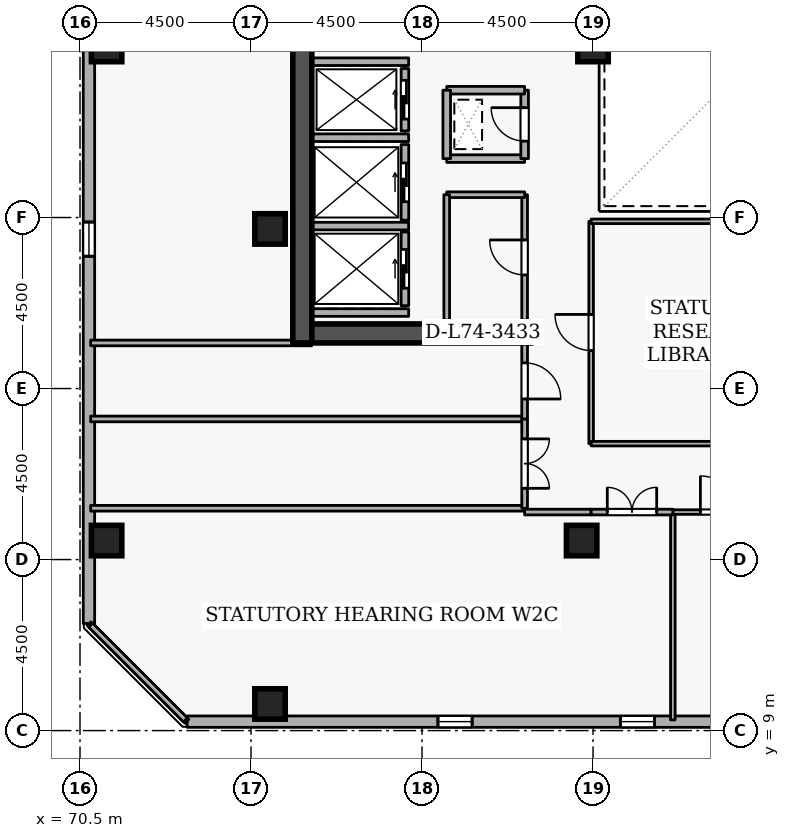
"""IFC4 building model, lengths in metres.
Left out: names, types, materials, properties, quantities, classifications, styles, units other than length and angle.
Written with IfcOpenShell. Run it as: python <this file> out.ifc"""

import sys

from ifc_helpers import new_model, si_unit, direction, frame, frame_2d, origin, origin_2d, place, context, subcontext, project, spatial, rectangle, extrude, element, fill, save


model = new_model("IFC4")
c1 = context("Model", 3, precision=1e-05, world=origin(), true_north=direction((0.0, 1.0)))
c2 = subcontext(c1, "Body", "Model", "MODEL_VIEW")
j1 = project(units=[si_unit("LENGTHUNIT", "METRE"), si_unit("PLANEANGLEUNIT", "RADIAN")], contexts=[c1])
p1 = place(None, origin())
s1 = spatial("IfcSite", under=j1, at=p1, CompositionType="ELEMENT")
p2 = place(p1, origin())
s2 = spatial("IfcBuilding", under=s1, at=p2, CompositionType="ELEMENT")
p3 = place(p2, frame((0.0, 0.0, 276.3)))
s3 = spatial("IfcBuildingStorey", under=s2, at=p3, CompositionType="ELEMENT", Elevation=276.3)
p4 = place(p3, frame((76.35, 19.2, 0.0), z_axis=(0.0, 0.0, 1.0), x_axis=(0.0, 1.0, 0.0)))
e1 = element("IfcWall", 1, at=p4, inside=s3, PredefinedType="SHEAR", context=c2, shape_type="SweptSolid", body=[
    extrude(rectangle(XDim=15.6, YDim=0.5, at=frame_2d((7.8, 0.0))), origin(), (0.0, 0.0, 1.0), 3.6),
])
p5 = place(p3, frame((76.6, 19.45, 0.0), z_axis=(0.0, 0.0, 1.0), x_axis=(1.0, 0.0, 0.0)))
e2 = element("IfcWall", 2, at=p5, inside=s3, PredefinedType="SHEAR", context=c2, shape_type="SweptSolid", body=[
    extrude(rectangle(XDim=5.8, YDim=0.5, at=frame_2d((2.9, 0.0))), origin(), (0.0, 0.0, 1.0), 3.6),
])
for number, where, z_axis, x_axis in (
    (3, (71.2, 14.0, 0.0), (0.0, 0.0, 1.0), (1.0, 0.0, 0.0)),
    (4, (71.2, 27.0, 0.0), (0.0, 0.0, 1.0), (1.0, 0.0, 0.0)),
    (5, (75.5, 9.7, 0.0), (0.0, 0.0, 1.0), (1.0, 0.0, 0.0)),
    (6, (83.7, 14.0, 0.0), (0.0, 0.0, 1.0), (1.0, 0.0, 0.0)),
    (7, (75.5, 22.2, 0.0), (0.0, 0.0, 1.0), (1.0, 0.0, 0.0)),
    (8, (84.0, 27.0, 0.0), (0.0, 0.0, 1.0), (1.0, 0.0, 0.0)),
):
    element("IfcColumn", number, at=place(p3, frame(where, z_axis=z_axis, x_axis=x_axis)), inside=s3, PredefinedType="COLUMN", context=c2, shape_type="SweptSolid", body=[
        extrude(rectangle(XDim=0.8, YDim=0.8, at=origin_2d()), origin(), (0.0, 0.0, 1.0), 3.6),
    ])
p6 = place(p3, frame((73.319, 9.235, 0.0), z_axis=(0.0, 0.0, 1.0), x_axis=(1.0, 0.0, 0.0)))
e9 = element("IfcWall", 9, at=p6, inside=s3, PredefinedType="STANDARD", context=c2, shape_type="SweptSolid", body=[
    extrude(rectangle(XDim=36.363, YDim=0.3, at=frame_2d((18.181, 0.0))), origin(), (0.0, 0.0, 1.0), 2.66),
])
p7 = place(p6, frame((6.6, 0.0, 0.72)))
e10 = element("IfcOpeningElement", 10, at=p7, cuts=e9, PredefinedType="OPENING", context=c2, shape_type="SweptSolid", body=[
    extrude(rectangle(XDim=0.9, YDim=1.75, at=frame_2d((0.45, 0.875))), frame((0.0, 0.16, 0.0), z_axis=(0.0, -1.0, 0.0), x_axis=(1.0, 0.0, 0.0)), (0.0, 0.0, 1.0), 0.32),
])
p8 = place(p6, frame((11.4, 0.0, 0.72)))
e11 = element("IfcOpeningElement", 11, at=p8, cuts=e9, PredefinedType="OPENING", context=c2, shape_type="SweptSolid", body=[
    extrude(rectangle(XDim=0.9, YDim=1.75, at=frame_2d((0.45, 0.875))), frame((0.0, 0.16, 0.0), z_axis=(0.0, -1.0, 0.0), x_axis=(1.0, 0.0, 0.0)), (0.0, 0.0, 1.0), 0.32),
])
p9 = place(p6, frame((21.0, 0.0, 0.72)))
e12 = element("IfcOpeningElement", 12, at=p9, cuts=e9, PredefinedType="OPENING", context=c2, shape_type="SweptSolid", body=[
    extrude(rectangle(XDim=0.9, YDim=1.75, at=frame_2d((0.45, 0.875))), frame((0.0, 0.16, 0.0), z_axis=(0.0, -1.0, 0.0), x_axis=(1.0, 0.0, 0.0)), (0.0, 0.0, 1.0), 0.32),
])
p10 = place(p6, frame((25.8, 0.0, 0.72)))
e13 = element("IfcOpeningElement", 13, at=p10, cuts=e9, PredefinedType="OPENING", context=c2, shape_type="SweptSolid", body=[
    extrude(rectangle(XDim=0.9, YDim=1.75, at=frame_2d((0.45, 0.875))), frame((0.0, 0.16, 0.0), z_axis=(0.0, -1.0, 0.0), x_axis=(1.0, 0.0, 0.0)), (0.0, 0.0, 1.0), 0.32),
])
p11 = place(p6, frame((30.6, 0.0, 0.72)))
e14 = element("IfcOpeningElement", 14, at=p11, cuts=e9, PredefinedType="OPENING", context=c2, shape_type="SweptSolid", body=[
    extrude(rectangle(XDim=0.9, YDim=1.75, at=frame_2d((0.45, 0.875))), frame((0.0, 0.16, 0.0), z_axis=(0.0, -1.0, 0.0), x_axis=(1.0, 0.0, 0.0)), (0.0, 0.0, 1.0), 0.32),
])
p12 = place(p3, frame((70.735, 48.181, 0.0), z_axis=(0.0, 0.0, 1.0), x_axis=(0.0, -1.0, 0.0)))
e15 = element("IfcWall", 15, at=p12, inside=s3, PredefinedType="STANDARD", context=c2, shape_type="SweptSolid", body=[
    extrude(rectangle(XDim=36.363, YDim=0.3, at=frame_2d((18.181, 0.0))), origin(), (0.0, 0.0, 1.0), 2.66),
])
p13 = place(p12, frame((1.8, 0.0, 0.72)))
e16 = element("IfcOpeningElement", 16, at=p13, cuts=e15, PredefinedType="OPENING", context=c2, shape_type="SweptSolid", body=[
    extrude(rectangle(XDim=0.9, YDim=1.75, at=frame_2d((0.45, 0.875))), frame((0.0, 0.16, 0.0), z_axis=(0.0, -1.0, 0.0), x_axis=(1.0, 0.0, 0.0)), (0.0, 0.0, 1.0), 0.32),
])
p14 = place(p12, frame((11.4, 0.0, 0.72)))
e17 = element("IfcOpeningElement", 17, at=p14, cuts=e15, PredefinedType="OPENING", context=c2, shape_type="SweptSolid", body=[
    extrude(rectangle(XDim=0.9, YDim=1.75, at=frame_2d((0.45, 0.875))), frame((0.0, 0.16, 0.0), z_axis=(0.0, -1.0, 0.0), x_axis=(1.0, 0.0, 0.0)), (0.0, 0.0, 1.0), 0.32),
])
p15 = place(p12, frame((16.2, 0.0, 0.72)))
e18 = element("IfcOpeningElement", 18, at=p15, cuts=e15, PredefinedType="OPENING", context=c2, shape_type="SweptSolid", body=[
    extrude(rectangle(XDim=0.9, YDim=1.75, at=frame_2d((0.45, 0.875))), frame((0.0, 0.16, 0.0), z_axis=(0.0, -1.0, 0.0), x_axis=(1.0, 0.0, 0.0)), (0.0, 0.0, 1.0), 0.32),
])
p16 = place(p12, frame((25.8, 0.0, 0.72)))
e19 = element("IfcOpeningElement", 19, at=p16, cuts=e15, PredefinedType="OPENING", context=c2, shape_type="SweptSolid", body=[
    extrude(rectangle(XDim=0.9, YDim=1.75, at=frame_2d((0.45, 0.875))), frame((0.0, 0.16, 0.0), z_axis=(0.0, -1.0, 0.0), x_axis=(1.0, 0.0, 0.0)), (0.0, 0.0, 1.0), 0.32),
])
p17 = place(p3, frame((79.05, 24.78, 0.0), z_axis=(0.0, 0.0, 1.0), x_axis=(0.0, 1.0, 0.0)))
e20 = element("IfcWall", 20, at=p17, inside=s3, PredefinedType="STANDARD", context=c2, shape_type="SweptSolid", body=[
    extrude(rectangle(XDim=1.64, YDim=0.2, at=frame_2d((0.82, 0.0))), origin(), (0.0, 0.0, 1.0), 3.26),
])
p18 = place(p17, frame((0.31, 0.0, 0.0)))
e21 = element("IfcOpeningElement", 21, at=p18, cuts=e20, PredefinedType="OPENING", context=c2, shape_type="SweptSolid", body=[
    extrude(rectangle(XDim=1.02, YDim=2.06, at=frame_2d((0.51, 1.03))), frame((0.0, 0.11, 0.0), z_axis=(0.0, -1.0, 0.0), x_axis=(1.0, 0.0, 0.0)), (0.0, 0.0, 1.0), 0.22),
])
p19 = place(p3, frame((79.05, 22.43, 0.0), z_axis=(0.0, 0.0, 1.0), x_axis=(0.0, 1.0, 0.0)))
e22 = element("IfcWall", 22, at=p19, inside=s3, PredefinedType="STANDARD", context=c2, shape_type="SweptSolid", body=[
    extrude(rectangle(XDim=1.99, YDim=0.2, at=frame_2d((0.995, 0.0))), origin(), (0.0, 0.0, 1.0), 3.26),
])
p20 = place(p19, frame((0.485, 0.0, 0.0)))
e23 = element("IfcOpeningElement", 23, at=p20, cuts=e22, PredefinedType="OPENING", context=c2, shape_type="SweptSolid", body=[
    extrude(rectangle(XDim=1.02, YDim=2.06, at=frame_2d((0.51, 1.03))), frame((0.0, 0.11, 0.0), z_axis=(0.0, -1.0, 0.0), x_axis=(1.0, 0.0, 0.0)), (0.0, 0.0, 1.0), 0.22),
])
p21 = place(p3, frame((79.05, 20.18, 0.0), z_axis=(0.0, 0.0, 1.0), x_axis=(0.0, 1.0, 0.0)))
e24 = element("IfcWall", 24, at=p21, inside=s3, PredefinedType="STANDARD", context=c2, shape_type="SweptSolid", body=[
    extrude(rectangle(XDim=1.94, YDim=0.2, at=frame_2d((0.97, 0.0))), origin(), (0.0, 0.0, 1.0), 3.26),
])
p22 = place(p21, frame((0.46, 0.0, 0.0)))
e25 = element("IfcOpeningElement", 25, at=p22, cuts=e24, PredefinedType="OPENING", context=c2, shape_type="SweptSolid", body=[
    extrude(rectangle(XDim=1.02, YDim=2.06, at=frame_2d((0.51, 1.03))), frame((0.0, 0.11, 0.0), z_axis=(0.0, -1.0, 0.0), x_axis=(1.0, 0.0, 0.0)), (0.0, 0.0, 1.0), 0.22),
])
for number, where, z_axis, x_axis in (
    (26, (76.612, 26.6, 0.0), (0.0, 0.0, 1.0), (1.0, 0.0, 0.0)),
    (27, (76.612, 24.6, 0.0), (0.0, 0.0, 1.0), (1.0, 0.0, 0.0)),
    (28, (76.612, 22.275, 0.0), (0.0, 0.0, 1.0), (1.0, 0.0, 0.0)),
    (29, (76.612, 20.0, 0.0), (0.0, 0.0, 1.0), (1.0, 0.0, 0.0)),
):
    element("IfcWall", number, at=place(p3, frame(where, z_axis=z_axis, x_axis=x_axis)), inside=s3, PredefinedType="STANDARD", context=c2, shape_type="SweptSolid", body=[
        extrude(rectangle(XDim=2.536, YDim=0.2, at=frame_2d((1.268, 0.0))), origin(), (0.0, 0.0, 1.0), 3.26),
    ])
p23 = place(p3, frame((80.15, 24.05, 0.0), z_axis=(0.0, 0.0, 1.0), x_axis=(1.0, 0.0, 0.0)))
e30 = element("IfcWall", 30, at=p23, inside=s3, PredefinedType="STANDARD", context=c2, shape_type="SweptSolid", body=[
    extrude(rectangle(XDim=2.05, YDim=0.2, at=frame_2d((1.025, 0.0))), origin(), (0.0, 0.0, 1.0), 3.26),
])
p24 = place(p3, frame((82.2, 24.05, 0.0), z_axis=(0.0, 0.0, 1.0), x_axis=(0.0, 1.0, 0.0)))
e31 = element("IfcWall", 31, at=p24, inside=s3, PredefinedType="STANDARD", context=c2, shape_type="SweptSolid", body=[
    extrude(rectangle(XDim=1.8, YDim=0.2, at=frame_2d((0.9, 0.0))), origin(), (0.0, 0.0, 1.0), 3.26),
])
p25 = place(p24, frame((0.46, 0.0, 0.0)))
e32 = element("IfcOpeningElement", 32, at=p25, cuts=e31, PredefinedType="OPENING", context=c2, shape_type="SweptSolid", body=[
    extrude(rectangle(XDim=0.88, YDim=2.04, at=frame_2d((0.44, 1.02))), frame((0.0, 0.11, 0.0), z_axis=(0.0, -1.0, 0.0), x_axis=(1.0, 0.0, 0.0)), (0.0, 0.0, 1.0), 0.22),
])
p26 = place(p3, frame((82.2, 25.85, 0.0), z_axis=(0.0, 0.0, 1.0), x_axis=(-1.0, 0.0, 0.0)))
e33 = element("IfcWall", 33, at=p26, inside=s3, PredefinedType="STANDARD", context=c2, shape_type="SweptSolid", body=[
    extrude(rectangle(XDim=2.05, YDim=0.2, at=frame_2d((1.025, 0.0))), origin(), (0.0, 0.0, 1.0), 3.26),
])
p27 = place(p3, frame((80.15, 25.85, 0.0), z_axis=(0.0, 0.0, 1.0), x_axis=(0.0, -1.0, 0.0)))
e34 = element("IfcWall", 34, at=p27, inside=s3, PredefinedType="STANDARD", context=c2, shape_type="SweptSolid", body=[
    extrude(rectangle(XDim=1.8, YDim=0.2, at=frame_2d((0.9, 0.0))), origin(), (0.0, 0.0, 1.0), 3.26),
])
p28 = place(p3, frame((82.2, 19.8, 0.0), z_axis=(0.0, 0.0, 1.0), x_axis=(0.0, 1.0, 0.0)))
e35 = element("IfcWall", 35, at=p28, inside=s3, PredefinedType="PARTITIONING", context=c2, shape_type="SweptSolid", body=[
    extrude(rectangle(XDim=3.3, YDim=0.15, at=frame_2d((1.65, 0.0))), origin(), (0.0, 0.0, 1.0), 3.26),
])
p29 = place(p28, frame((1.19, 0.0, 0.0)))
e36 = element("IfcOpeningElement", 36, at=p29, cuts=e35, PredefinedType="OPENING", context=c2, shape_type="SweptSolid", body=[
    extrude(rectangle(XDim=0.92, YDim=2.08, at=frame_2d((0.46, 1.04))), frame((0.0, 0.085, 0.0), z_axis=(0.0, -1.0, 0.0), x_axis=(1.0, 0.0, 0.0)), (0.0, 0.0, 1.0), 0.17),
])
p30 = place(p3, frame((82.2, 23.1, 0.0), z_axis=(0.0, 0.0, 1.0), x_axis=(-1.0, 0.0, 0.0)))
e37 = element("IfcWall", 37, at=p30, inside=s3, PredefinedType="PARTITIONING", context=c2, shape_type="SweptSolid", body=[
    extrude(rectangle(XDim=2.05, YDim=0.15, at=frame_2d((1.025, 0.0))), origin(), (0.0, 0.0, 1.0), 3.26),
])
p31 = place(p3, frame((80.15, 23.1, 0.0), z_axis=(0.0, 0.0, 1.0), x_axis=(0.0, -1.0, 0.0)))
e38 = element("IfcWall", 38, at=p31, inside=s3, PredefinedType="PARTITIONING", context=c2, shape_type="SweptSolid", body=[
    extrude(rectangle(XDim=3.3, YDim=0.15, at=frame_2d((1.65, 0.0))), origin(), (0.0, 0.0, 1.0), 3.26),
])
for number, where, z_axis, x_axis in (
    (39, (82.2, 14.85, 0.0), (0.0, 0.0, 1.0), (-1.0, 0.0, 0.0)),
    (40, (70.78, 17.2, 0.0), (0.0, 0.0, 1.0), (1.0, 0.0, 0.0)),
):
    element("IfcWall", number, at=place(p3, frame(where, z_axis=z_axis, x_axis=x_axis)), inside=s3, PredefinedType="PARTITIONING", context=c2, shape_type="SweptSolid", body=[
        extrude(rectangle(XDim=11.42, YDim=0.15, at=frame_2d((5.71, 0.0))), origin(), (0.0, 0.0, 1.0), 3.26),
    ])
p32 = place(p3, frame((82.2, 17.2, 0.0), z_axis=(0.0, 0.0, 1.0), x_axis=(0.0, -1.0, 0.0)))
e41 = element("IfcWall", 41, at=p32, inside=s3, PredefinedType="PARTITIONING", context=c2, shape_type="SweptSolid", body=[
    extrude(rectangle(XDim=2.35, YDim=0.15, at=frame_2d((1.175, 0.0))), origin(), (0.0, 0.0, 1.0), 3.26),
])
p33 = place(p32, frame((0.525, 0.0, 0.0)))
e42 = element("IfcOpeningElement", 42, at=p33, cuts=e41, PredefinedType="OPENING", context=c2, shape_type="SweptSolid", body=[
    extrude(rectangle(XDim=1.3, YDim=2.12, at=frame_2d((0.65, 1.06))), frame((0.0, 0.085, 0.0), z_axis=(0.0, -1.0, 0.0), x_axis=(1.0, 0.0, 0.0)), (0.0, 0.0, 1.0), 0.17),
])
p34 = place(p3, frame((70.78, 19.2, 0.0), z_axis=(0.0, 0.0, 1.0), x_axis=(1.0, 0.0, 0.0)))
e43 = element("IfcWall", 43, at=p34, inside=s3, PredefinedType="PARTITIONING", context=c2, shape_type="SweptSolid", body=[
    extrude(rectangle(XDim=5.82, YDim=0.15, at=frame_2d((2.91, 0.0))), origin(), (0.0, 0.0, 1.0), 2.465),
])
p35 = place(p3, frame((82.2, 19.2, 0.0), z_axis=(0.0, 0.0, 1.0), x_axis=(0.0, -1.0, 0.0)))
e44 = element("IfcWall", 44, at=p35, inside=s3, PredefinedType="PARTITIONING", context=c2, shape_type="SweptSolid", body=[
    extrude(rectangle(XDim=2.0, YDim=0.15, at=frame_2d((1.0, 0.0))), origin(), (0.0, 0.0, 1.0), 3.26),
])
p36 = place(p35, frame((0.525, 0.0, 0.0)))
e45 = element("IfcOpeningElement", 45, at=p36, cuts=e44, PredefinedType="OPENING", context=c2, shape_type="SweptSolid", body=[
    extrude(rectangle(XDim=0.95, YDim=2.1, at=frame_2d((0.475, 1.05))), frame((0.0, 0.085, 0.0), z_axis=(0.0, -1.0, 0.0), x_axis=(1.0, 0.0, 0.0)), (0.0, 0.0, 1.0), 0.17),
])
p37 = place(p3, frame((86.1, 9.28, 0.0), z_axis=(0.0, 0.0, 1.0), x_axis=(0.0, 1.0, 0.0)))
e46 = element("IfcWall", 46, at=p37, inside=s3, PredefinedType="PARTITIONING", context=c2, shape_type="SweptSolid", body=[
    extrude(rectangle(XDim=5.47, YDim=0.12, at=frame_2d((2.735, 0.0))), origin(), (0.0, 0.0, 1.0), 3.26),
])
p38 = place(p3, frame((86.1, 14.75, 0.0), z_axis=(0.0, 0.0, 1.0), x_axis=(1.0, 0.0, 0.0)))
e47 = element("IfcWall", 47, at=p38, inside=s3, PredefinedType="PARTITIONING", context=c2, shape_type="SweptSolid", body=[
    extrude(rectangle(XDim=2.4, YDim=0.12, at=frame_2d((1.2, 0.0))), origin(), (0.0, 0.0, 1.0), 3.26),
])
p39 = place(p38, frame((0.725, 0.0, 0.0)))
e48 = element("IfcOpeningElement", 48, at=p39, cuts=e47, PredefinedType="OPENING", context=c2, shape_type="SweptSolid", body=[
    extrude(rectangle(XDim=0.95, YDim=2.1, at=frame_2d((0.475, 1.05))), frame((0.0, 0.07, 0.0), z_axis=(0.0, -1.0, 0.0), x_axis=(1.0, 0.0, 0.0)), (0.0, 0.0, 1.0), 0.14),
])
p40 = place(p3, frame((73.275, 9.28, 0.0), z_axis=(0.0, 0.0, 1.0), x_axis=(-0.707106781187, 0.707106781187, 0.0)))
e49 = element("IfcWall", 49, at=p40, inside=s3, PredefinedType="PARTITIONING", context=c2, shape_type="SweptSolid", body=[
    extrude(rectangle(XDim=3.528, YDim=0.15, at=frame_2d((1.764, 0.0))), origin(), (0.0, 0.0, 1.0), 3.26),
])
p41 = place(p3, frame((82.2, 14.75, 0.0), z_axis=(0.0, 0.0, 1.0), x_axis=(1.0, 0.0, 0.0)))
e50 = element("IfcWall", 50, at=p41, inside=s3, PredefinedType="PARTITIONING", context=c2, shape_type="SweptSolid", body=[
    extrude(rectangle(XDim=1.75, YDim=0.15, at=frame_2d((0.875, 0.0))), origin(), (0.0, 0.0, 1.0), 3.26),
])
p42 = place(p3, frame((83.95, 14.75, 0.0), z_axis=(0.0, 0.0, 1.0), x_axis=(1.0, 0.0, 0.0)))
e51 = element("IfcWall", 51, at=p42, inside=s3, PredefinedType="PARTITIONING", context=c2, shape_type="SweptSolid", body=[
    extrude(rectangle(XDim=2.15, YDim=0.15, at=frame_2d((1.075, 0.0))), origin(), (0.0, 0.0, 1.0), 3.26),
])
p43 = place(p42, frame((0.425, 0.0, 0.0)))
e52 = element("IfcOpeningElement", 52, at=p43, cuts=e51, PredefinedType="OPENING", context=c2, shape_type="SweptSolid", body=[
    extrude(rectangle(XDim=1.3, YDim=2.12, at=frame_2d((0.65, 1.06))), frame((0.0, 0.085, 0.0), z_axis=(0.0, -1.0, 0.0), x_axis=(1.0, 0.0, 0.0)), (0.0, 0.0, 1.0), 0.17),
])
p44 = place(p3, frame((83.95, 16.55, 0.0), z_axis=(0.0, 0.0, 1.0), x_axis=(0.0, 1.0, 0.0)))
e53 = element("IfcWall", 53, at=p44, inside=s3, PredefinedType="PARTITIONING", context=c2, shape_type="SweptSolid", body=[
    extrude(rectangle(XDim=5.85, YDim=0.12, at=frame_2d((2.925, 0.0))), origin(), (0.0, 0.0, 1.0), 3.26),
])
p45 = place(p44, frame((2.45, 0.0, 0.0)))
e54 = element("IfcOpeningElement", 54, at=p45, cuts=e53, PredefinedType="OPENING", context=c2, shape_type="SweptSolid", body=[
    extrude(rectangle(XDim=0.95, YDim=2.1, at=frame_2d((0.475, 1.05))), frame((0.0, 0.07, 0.0), z_axis=(0.0, -1.0, 0.0), x_axis=(1.0, 0.0, 0.0)), (0.0, 0.0, 1.0), 0.14),
])
for number, where, z_axis, x_axis in (
    (55, (83.95, 22.4, 0.0), (0.0, 0.0, 1.0), (1.0, 0.0, 0.0)),
    (56, (89.3, 16.55, 0.0), (0.0, 0.0, 1.0), (-1.0, 0.0, 0.0)),
):
    element("IfcWall", number, at=place(p3, frame(where, z_axis=z_axis, x_axis=x_axis)), inside=s3, PredefinedType="PARTITIONING", context=c2, shape_type="SweptSolid", body=[
        extrude(rectangle(XDim=5.35, YDim=0.12, at=frame_2d((2.675, 0.0))), origin(), (0.0, 0.0, 1.0), 3.26),
    ])
p46 = place(p7, origin())
e57 = element("IfcWindow", 57, at=p46, inside=s3, PartitioningType="SINGLE_PANEL", PredefinedType="WINDOW", context=c2, shape_type="SweptSolid", body=[
    extrude(rectangle(XDim=0.9, YDim=1.75, at=frame_2d((0.45, 0.875))), frame((0.0, 0.03, 0.0), z_axis=(0.0, -1.0, 0.0), x_axis=(1.0, 0.0, 0.0)), (0.0, 0.0, 1.0), 0.06),
])
fill(e10, e57)
p47 = place(p8, origin())
e58 = element("IfcWindow", 58, at=p47, inside=s3, PartitioningType="SINGLE_PANEL", PredefinedType="WINDOW", context=c2, shape_type="SweptSolid", body=[
    extrude(rectangle(XDim=0.9, YDim=1.75, at=frame_2d((0.45, 0.875))), frame((0.0, 0.03, 0.0), z_axis=(0.0, -1.0, 0.0), x_axis=(1.0, 0.0, 0.0)), (0.0, 0.0, 1.0), 0.06),
])
fill(e11, e58)
p48 = place(p16, origin())
e59 = element("IfcWindow", 59, at=p48, inside=s3, PartitioningType="SINGLE_PANEL", PredefinedType="WINDOW", context=c2, shape_type="SweptSolid", body=[
    extrude(rectangle(XDim=0.9, YDim=1.75, at=frame_2d((0.45, 0.875))), frame((0.0, 0.03, 0.0), z_axis=(0.0, -1.0, 0.0), x_axis=(1.0, 0.0, 0.0)), (0.0, 0.0, 1.0), 0.06),
])
fill(e19, e59)
p49 = place(p18, origin())
e60 = element("IfcDoor", 60, at=p49, inside=s3, OperationType="SLIDING_TO_LEFT", PredefinedType="DOOR", context=c2, shape_type="SweptSolid", body=[
    extrude(rectangle(XDim=1.02, YDim=2.06, at=frame_2d((0.51, 1.03))), frame((0.0, 0.025, 0.0), z_axis=(0.0, -1.0, 0.0), x_axis=(1.0, 0.0, 0.0)), (0.0, 0.0, 1.0), 0.05),
])
fill(e21, e60)
p50 = place(p20, origin())
e61 = element("IfcDoor", 61, at=p50, inside=s3, OperationType="SLIDING_TO_LEFT", PredefinedType="DOOR", context=c2, shape_type="SweptSolid", body=[
    extrude(rectangle(XDim=1.02, YDim=2.06, at=frame_2d((0.51, 1.03))), frame((0.0, 0.025, 0.0), z_axis=(0.0, -1.0, 0.0), x_axis=(1.0, 0.0, 0.0)), (0.0, 0.0, 1.0), 0.05),
])
fill(e23, e61)
p51 = place(p22, origin())
e62 = element("IfcDoor", 62, at=p51, inside=s3, OperationType="SLIDING_TO_LEFT", PredefinedType="DOOR", context=c2, shape_type="SweptSolid", body=[
    extrude(rectangle(XDim=1.02, YDim=2.06, at=frame_2d((0.51, 1.03))), frame((0.0, 0.025, 0.0), z_axis=(0.0, -1.0, 0.0), x_axis=(1.0, 0.0, 0.0)), (0.0, 0.0, 1.0), 0.05),
])
fill(e25, e62)
p52 = place(p25, origin())
e63 = element("IfcDoor", 63, at=p52, inside=s3, OperationType="SINGLE_SWING_RIGHT", PredefinedType="DOOR", context=c2, shape_type="SweptSolid", body=[
    extrude(rectangle(XDim=0.88, YDim=2.04, at=frame_2d((0.44, 1.02))), frame((0.0, 0.025, 0.0), z_axis=(0.0, -1.0, 0.0), x_axis=(1.0, 0.0, 0.0)), (0.0, 0.0, 1.0), 0.05),
])
fill(e32, e63)
p53 = place(p29, origin())
e64 = element("IfcDoor", 64, at=p53, inside=s3, OperationType="SINGLE_SWING_RIGHT", PredefinedType="DOOR", context=c2, shape_type="SweptSolid", body=[
    extrude(rectangle(XDim=0.92, YDim=2.08, at=frame_2d((0.46, 1.04))), frame((0.0, 0.025, 0.0), z_axis=(0.0, -1.0, 0.0), x_axis=(1.0, 0.0, 0.0)), (0.0, 0.0, 1.0), 0.05),
])
fill(e36, e64)
p54 = place(p33, origin())
e65 = element("IfcDoor", 65, at=p54, inside=s3, OperationType="DOUBLE_DOOR_SINGLE_SWING", PredefinedType="DOOR", context=c2, shape_type="SweptSolid", body=[
    extrude(rectangle(XDim=1.3, YDim=2.12, at=frame_2d((0.65, 1.06))), frame((0.0, 0.025, 0.0), z_axis=(0.0, -1.0, 0.0), x_axis=(1.0, 0.0, 0.0)), (0.0, 0.0, 1.0), 0.05),
])
fill(e42, e65)
p55 = place(p36, origin())
e66 = element("IfcDoor", 66, at=p55, inside=s3, OperationType="SINGLE_SWING_RIGHT", PredefinedType="DOOR", context=c2, shape_type="SweptSolid", body=[
    extrude(rectangle(XDim=0.95, YDim=2.1, at=frame_2d((0.475, 1.05))), frame((0.0, 0.025, 0.0), z_axis=(0.0, -1.0, 0.0), x_axis=(1.0, 0.0, 0.0)), (0.0, 0.0, 1.0), 0.05),
])
fill(e45, e66)
p56 = place(p39, origin())
e67 = element("IfcDoor", 67, at=p56, inside=s3, OperationType="SINGLE_SWING_LEFT", PredefinedType="DOOR", context=c2, shape_type="SweptSolid", body=[
    extrude(rectangle(XDim=0.95, YDim=2.1, at=frame_2d((0.475, 1.05))), frame((0.0, 0.025, 0.0), z_axis=(0.0, -1.0, 0.0), x_axis=(1.0, 0.0, 0.0)), (0.0, 0.0, 1.0), 0.05),
])
fill(e48, e67)
p57 = place(p43, origin())
e68 = element("IfcDoor", 68, at=p57, inside=s3, OperationType="DOUBLE_DOOR_SINGLE_SWING", PredefinedType="DOOR", context=c2, shape_type="SweptSolid", body=[
    extrude(rectangle(XDim=1.3, YDim=2.12, at=frame_2d((0.65, 1.06))), frame((0.0, 0.025, 0.0), z_axis=(0.0, -1.0, 0.0), x_axis=(1.0, 0.0, 0.0)), (0.0, 0.0, 1.0), 0.05),
])
fill(e52, e68)
p58 = place(p45, origin())
e69 = element("IfcDoor", 69, at=p58, inside=s3, OperationType="SINGLE_SWING_RIGHT", PredefinedType="DOOR", context=c2, shape_type="SweptSolid", body=[
    extrude(rectangle(XDim=0.95, YDim=2.1, at=frame_2d((0.475, 1.05))), frame((0.0, 0.025, 0.0), z_axis=(0.0, -1.0, 0.0), x_axis=(1.0, 0.0, 0.0)), (0.0, 0.0, 1.0), 0.05),
])
fill(e54, e69)
save(model, sys.argv[1])
